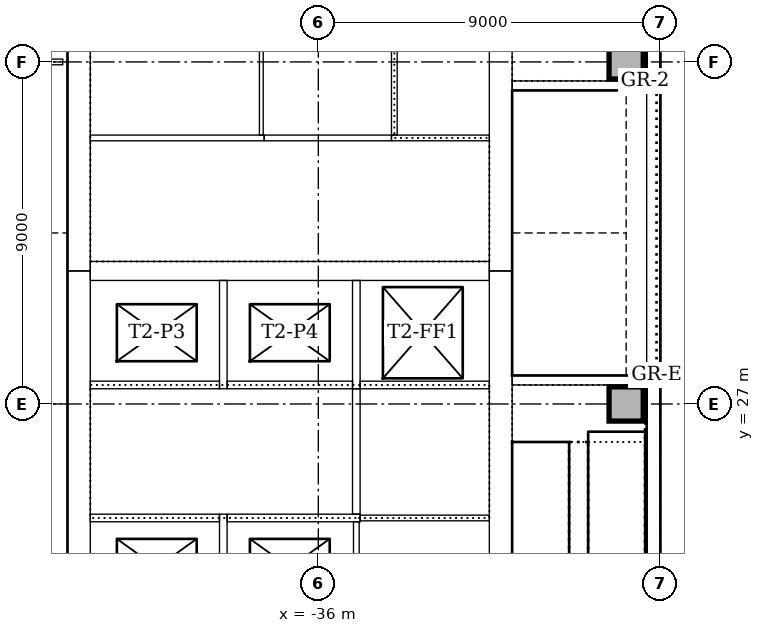
"""IFC4 building model, lengths in metres.
Left out: names, types, materials, properties, quantities, classifications, styles, units other than length and angle.
Written with IfcOpenShell. Run it as: python <this file> out.ifc"""

import sys

from ifc_helpers import new_model, si_unit, direction, frame, frame_2d, origin, origin_2d, place, context, subcontext, project, spatial, rectangle, extrude, element, fill, save


model = new_model("IFC4")
c1 = context("Model", 3, precision=1e-05, world=origin(), true_north=direction((0.0, 1.0)))
c2 = subcontext(c1, "Body", "Model", "MODEL_VIEW")
j1 = project(units=[si_unit("LENGTHUNIT", "METRE"), si_unit("PLANEANGLEUNIT", "RADIAN")], contexts=[c1])
p1 = place(None, origin())
s1 = spatial("IfcSite", under=j1, at=p1, CompositionType="ELEMENT")
p2 = place(p1, origin())
s2 = spatial("IfcBuilding", under=s1, at=p2, CompositionType="ELEMENT")
p3 = place(p2, frame((0.0, 0.0, 26.0)))
s3 = spatial("IfcBuildingStorey", under=s2, at=p3, CompositionType="ELEMENT", Elevation=26.0)
p4 = place(p3, frame((-31.2, 21.0, 0.0), z_axis=(0.0, 0.0, 1.0), x_axis=(0.0, 1.0, 0.0)))
e1 = element("IfcWall", 1, at=p4, inside=s3, PredefinedType="SOLIDWALL", context=c2, shape_type="SweptSolid", body=[
    extrude(rectangle(XDim=9.5, YDim=0.6, at=frame_2d((4.75, 0.0))), origin(), (0.0, 0.0, 1.0), 4.0),
])
p5 = place(p4, frame((5.25, 0.0, 0.0)))
e2 = element("IfcOpeningElement", 2, at=p5, cuts=e1, PredefinedType="OPENING", context=c2, shape_type="SweptSolid", body=[
    extrude(rectangle(XDim=1.0, YDim=2.1, at=frame_2d((0.5, 1.05))), frame((0.0, 0.31, 0.0), z_axis=(0.0, -1.0, 0.0), x_axis=(1.0, 0.0, 0.0)), (0.0, 0.0, 1.0), 0.62),
])
p6 = place(p3, frame((-31.2, 30.5, 0.0), z_axis=(0.0, 0.0, 1.0), x_axis=(0.0, 1.0, 0.0)))
e3 = element("IfcWall", 3, at=p6, inside=s3, PredefinedType="SOLIDWALL", context=c2, shape_type="SweptSolid", body=[
    extrude(rectangle(XDim=11.5, YDim=0.6, at=frame_2d((5.75, 0.0))), origin(), (0.0, 0.0, 1.0), 4.0),
])
p7 = place(p6, frame((0.85, 0.0, 0.0)))
e4 = element("IfcOpeningElement", 4, at=p7, cuts=e3, PredefinedType="OPENING", context=c2, shape_type="SweptSolid", body=[
    extrude(rectangle(XDim=1.8, YDim=2.1, at=frame_2d((0.9, 1.05))), frame((0.0, 0.31, 0.0), z_axis=(0.0, -1.0, 0.0), x_axis=(1.0, 0.0, 0.0)), (0.0, 0.0, 1.0), 0.62),
])
p8 = place(p3, frame((-42.3, 42.0, 0.0), z_axis=(0.0, 0.0, 1.0), x_axis=(0.0, -1.0, 0.0)))
e5 = element("IfcWall", 5, at=p8, inside=s3, PredefinedType="SOLIDWALL", context=c2, shape_type="SweptSolid", body=[
    extrude(rectangle(XDim=11.5, YDim=0.6, at=frame_2d((5.75, 0.0))), origin(), (0.0, 0.0, 1.0), 4.0),
])
p9 = place(p8, frame((8.85, 0.0, 0.0)))
e6 = element("IfcOpeningElement", 6, at=p9, cuts=e5, PredefinedType="OPENING", context=c2, shape_type="SweptSolid", body=[
    extrude(rectangle(XDim=1.8, YDim=2.1, at=frame_2d((0.9, 1.05))), frame((0.0, 0.31, 0.0), z_axis=(0.0, -1.0, 0.0), x_axis=(1.0, 0.0, 0.0)), (0.0, 0.0, 1.0), 0.62),
])
p10 = place(p3, frame((-42.3, 30.5, 0.0), z_axis=(0.0, 0.0, 1.0), x_axis=(0.0, -1.0, 0.0)))
e7 = element("IfcWall", 7, at=p10, inside=s3, PredefinedType="SOLIDWALL", context=c2, shape_type="SweptSolid", body=[
    extrude(rectangle(XDim=9.5, YDim=0.6, at=frame_2d((4.75, 0.0))), origin(), (0.0, 0.0, 1.0), 4.0),
])
p11 = place(p10, frame((3.85, 0.0, 0.0)))
e8 = element("IfcOpeningElement", 8, at=p11, cuts=e7, PredefinedType="OPENING", context=c2, shape_type="SweptSolid", body=[
    extrude(rectangle(XDim=1.8, YDim=2.1, at=frame_2d((0.9, 1.05))), frame((0.0, 0.31, 0.0), z_axis=(0.0, -1.0, 0.0), x_axis=(1.0, 0.0, 0.0)), (0.0, 0.0, 1.0), 0.62),
])
p12 = place(p3, frame((-42.0, 30.5, 0.0), z_axis=(0.0, 0.0, 1.0), x_axis=(1.0, 0.0, 0.0)))
e9 = element("IfcWall", 9, at=p12, inside=s3, PredefinedType="SOLIDWALL", context=c2, shape_type="SweptSolid", body=[
    extrude(rectangle(XDim=10.5, YDim=0.5, at=frame_2d((5.25, 0.0))), origin(), (0.0, 0.0, 1.0), 4.0),
])
p13 = place(p3, frame((-27.36, 27.625, 0.0), z_axis=(0.0, 0.0, 1.0), x_axis=(-1.0, 0.0, 0.0)))
e10 = element("IfcWall", 10, at=p13, inside=s3, PredefinedType="SOLIDWALL", context=c2, shape_type="SweptSolid", body=[
    extrude(rectangle(XDim=3.54, YDim=0.25, at=frame_2d((1.77, 0.0))), origin(), (0.0, 0.0, 1.0), 4.0),
])
p14 = place(p13, frame((1.69, 0.0, 0.0)))
e11 = element("IfcOpeningElement", 11, at=p14, cuts=e10, PredefinedType="OPENING", context=c2, shape_type="SweptSolid", body=[
    extrude(rectangle(XDim=1.1, YDim=2.1, at=frame_2d((0.55, 1.05))), frame((0.0, 0.135, 0.0), z_axis=(0.0, -1.0, 0.0), x_axis=(1.0, 0.0, 0.0)), (0.0, 0.0, 1.0), 0.27),
])
p15 = place(p3, frame((-30.9, 35.375, 0.0), z_axis=(0.0, 0.0, 1.0), x_axis=(1.0, 0.0, 0.0)))
e12 = element("IfcWall", 12, at=p15, inside=s3, PredefinedType="SOLIDWALL", context=c2, shape_type="SweptSolid", body=[
    extrude(rectangle(XDim=3.54, YDim=0.25, at=frame_2d((1.77, 0.0))), origin(), (0.0, 0.0, 1.0), 4.0),
])
p16 = place(p15, frame((0.75, 0.0, 0.0)))
e13 = element("IfcOpeningElement", 13, at=p16, cuts=e12, PredefinedType="OPENING", context=c2, shape_type="SweptSolid", body=[
    extrude(rectangle(XDim=1.1, YDim=2.1, at=frame_2d((0.55, 1.05))), frame((0.0, 0.135, 0.0), z_axis=(0.0, -1.0, 0.0), x_axis=(1.0, 0.0, 0.0)), (0.0, 0.0, 1.0), 0.27),
])
for number, where, z_axis, x_axis in (
    (14, (-27.9, 27.0, 0.0), (0.0, 0.0, 1.0), (1.0, 0.0, 0.0)),
    (15, (-27.9, 36.0, 0.0), (0.0, 0.0, 1.0), (1.0, 0.0, 0.0)),
):
    element("IfcColumn", number, at=place(p3, frame(where, z_axis=z_axis, x_axis=x_axis)), inside=s3, PredefinedType="COLUMN", context=c2, shape_type="SweptSolid", body=[
        extrude(rectangle(XDim=0.9, YDim=0.9, at=origin_2d()), origin(), (0.0, 0.0, 1.0), 4.0),
    ])
p17 = place(p3, frame((-27.18, 21.0, 0.0), z_axis=(0.0, 0.0, 1.0), x_axis=(0.0, 1.0, 0.0)))
e16 = element("IfcWall", 16, at=p17, inside=s3, PredefinedType="STANDARD", context=c2, shape_type="SweptSolid", body=[
    extrude(rectangle(XDim=6.75, YDim=0.36, at=frame_2d((3.375, 0.0))), origin(), (0.0, 0.0, 1.0), 3.85),
])
p18 = place(p3, frame((-27.18, 27.75, 0.0), z_axis=(0.0, 0.0, 1.0), x_axis=(0.0, 1.0, 0.0)))
e17 = element("IfcWall", 17, at=p18, inside=s3, PredefinedType="STANDARD", context=c2, shape_type="SweptSolid", body=[
    extrude(rectangle(XDim=7.5, YDim=0.36, at=frame_2d((3.75, 0.0))), origin(), (0.0, 0.0, 1.0), 3.85),
])
p19 = place(p18, frame((2.85, 0.0, 1.2)))
e18 = element("IfcOpeningElement", 18, at=p19, cuts=e17, PredefinedType="OPENING", context=c2, shape_type="SweptSolid", body=[
    extrude(rectangle(XDim=1.8, YDim=1.2, at=frame_2d((0.9, 0.6))), frame((0.0, 0.19, 0.0), z_axis=(0.0, -1.0, 0.0), x_axis=(1.0, 0.0, 0.0)), (0.0, 0.0, 1.0), 0.38),
])
p20 = place(p3, frame((-27.18, 35.25, 0.0), z_axis=(0.0, 0.0, 1.0), x_axis=(0.0, 1.0, 0.0)))
e19 = element("IfcWall", 19, at=p20, inside=s3, PredefinedType="STANDARD", context=c2, shape_type="SweptSolid", body=[
    extrude(rectangle(XDim=5.507, YDim=0.36, at=frame_2d((2.754, 0.0))), origin(), (0.0, 0.0, 1.0), 3.85),
])
p21 = place(p3, frame((-38.5, 21.0, 0.0), z_axis=(0.0, 0.0, 1.0), x_axis=(0.0, 1.0, 0.0)))
e20 = element("IfcWall", 20, at=p21, inside=s3, PredefinedType="SOLIDWALL", context=c2, shape_type="SweptSolid", body=[
    extrude(rectangle(XDim=3.1, YDim=0.2, at=frame_2d((1.55, 0.0))), origin(), (0.0, 0.0, 1.0), 4.0),
])
p22 = place(p3, frame((-38.6, 24.0, 0.0), z_axis=(0.0, 0.0, 1.0), x_axis=(-1.0, 0.0, 0.0)))
e21 = element("IfcWall", 21, at=p22, inside=s3, PredefinedType="SOLIDWALL", context=c2, shape_type="SweptSolid", body=[
    extrude(rectangle(XDim=3.4, YDim=0.2, at=frame_2d((1.7, 0.0))), origin(), (0.0, 0.0, 1.0), 4.0),
])
p23 = place(p22, frame((0.8, 0.0, 0.0)))
e22 = element("IfcOpeningElement", 22, at=p23, cuts=e21, PredefinedType="OPENING", context=c2, shape_type="SweptSolid", body=[
    extrude(rectangle(XDim=1.1, YDim=2.1, at=frame_2d((0.55, 1.05))), frame((0.0, 0.11, 0.0), z_axis=(0.0, -1.0, 0.0), x_axis=(1.0, 0.0, 0.0)), (0.0, 0.0, 1.0), 0.22),
])
p24 = place(p3, frame((-34.9, 24.0, 0.0), z_axis=(0.0, 0.0, 1.0), x_axis=(-1.0, 0.0, 0.0)))
e23 = element("IfcWall", 23, at=p24, inside=s3, PredefinedType="SOLIDWALL", context=c2, shape_type="SweptSolid", body=[
    extrude(rectangle(XDim=3.5, YDim=0.2, at=frame_2d((1.75, 0.0))), origin(), (0.0, 0.0, 1.0), 4.0),
])
p25 = place(p24, frame((1.3, 0.0, 0.0)))
e24 = element("IfcOpeningElement", 24, at=p25, cuts=e23, PredefinedType="OPENING", context=c2, shape_type="SweptSolid", body=[
    extrude(rectangle(XDim=1.1, YDim=2.1, at=frame_2d((0.55, 1.05))), frame((0.0, 0.11, 0.0), z_axis=(0.0, -1.0, 0.0), x_axis=(1.0, 0.0, 0.0)), (0.0, 0.0, 1.0), 0.22),
])
p26 = place(p3, frame((-38.5, 27.4, 0.0), z_axis=(0.0, 0.0, 1.0), x_axis=(0.0, 1.0, 0.0)))
e25 = element("IfcWall", 25, at=p26, inside=s3, PredefinedType="SOLIDWALL", context=c2, shape_type="SweptSolid", body=[
    extrude(rectangle(XDim=2.85, YDim=0.2, at=frame_2d((1.425, 0.0))), origin(), (0.0, 0.0, 1.0), 4.0),
])
p27 = place(p3, frame((-42.0, 27.5, 0.0), z_axis=(0.0, 0.0, 1.0), x_axis=(1.0, 0.0, 0.0)))
e26 = element("IfcWall", 26, at=p27, inside=s3, PredefinedType="SOLIDWALL", context=c2, shape_type="SweptSolid", body=[
    extrude(rectangle(XDim=3.4, YDim=0.2, at=frame_2d((1.7, 0.0))), origin(), (0.0, 0.0, 1.0), 4.0),
])
p28 = place(p27, frame((1.5, 0.0, 0.0)))
e27 = element("IfcOpeningElement", 27, at=p28, cuts=e26, PredefinedType="OPENING", context=c2, shape_type="SweptSolid", body=[
    extrude(rectangle(XDim=1.1, YDim=2.1, at=frame_2d((0.55, 1.05))), frame((0.0, 0.11, 0.0), z_axis=(0.0, -1.0, 0.0), x_axis=(1.0, 0.0, 0.0)), (0.0, 0.0, 1.0), 0.22),
])
p29 = place(p3, frame((-35.0, 27.4, 0.0), z_axis=(0.0, 0.0, 1.0), x_axis=(0.0, 1.0, 0.0)))
e28 = element("IfcWall", 28, at=p29, inside=s3, PredefinedType="SOLIDWALL", context=c2, shape_type="SweptSolid", body=[
    extrude(rectangle(XDim=2.85, YDim=0.2, at=frame_2d((1.425, 0.0))), origin(), (0.0, 0.0, 1.0), 4.0),
])
p30 = place(p3, frame((-38.4, 27.5, 0.0), z_axis=(0.0, 0.0, 1.0), x_axis=(1.0, 0.0, 0.0)))
e29 = element("IfcWall", 29, at=p30, inside=s3, PredefinedType="SOLIDWALL", context=c2, shape_type="SweptSolid", body=[
    extrude(rectangle(XDim=3.3, YDim=0.2, at=frame_2d((1.65, 0.0))), origin(), (0.0, 0.0, 1.0), 4.0),
])
p31 = place(p30, frame((1.1, 0.0, 0.0)))
e30 = element("IfcOpeningElement", 30, at=p31, cuts=e29, PredefinedType="OPENING", context=c2, shape_type="SweptSolid", body=[
    extrude(rectangle(XDim=1.1, YDim=2.1, at=frame_2d((0.55, 1.05))), frame((0.0, 0.11, 0.0), z_axis=(0.0, -1.0, 0.0), x_axis=(1.0, 0.0, 0.0)), (0.0, 0.0, 1.0), 0.22),
])
p32 = place(p3, frame((-34.9, 27.5, 0.0), z_axis=(0.0, 0.0, 1.0), x_axis=(1.0, 0.0, 0.0)))
e31 = element("IfcWall", 31, at=p32, inside=s3, PredefinedType="SOLIDWALL", context=c2, shape_type="SweptSolid", body=[
    extrude(rectangle(XDim=3.4, YDim=0.2, at=frame_2d((1.7, 0.0))), origin(), (0.0, 0.0, 1.0), 4.0),
])
p33 = place(p32, frame((1.1, 0.0, 0.0)))
e32 = element("IfcOpeningElement", 32, at=p33, cuts=e31, PredefinedType="OPENING", context=c2, shape_type="SweptSolid", body=[
    extrude(rectangle(XDim=1.1, YDim=2.1, at=frame_2d((0.55, 1.05))), frame((0.0, 0.11, 0.0), z_axis=(0.0, -1.0, 0.0), x_axis=(1.0, 0.0, 0.0)), (0.0, 0.0, 1.0), 0.22),
])
p34 = place(p3, frame((-35.0, 24.1, 0.0), z_axis=(0.0, 0.0, 1.0), x_axis=(0.0, 1.0, 0.0)))
e33 = element("IfcWall", 33, at=p34, inside=s3, PredefinedType="SOLIDWALL", context=c2, shape_type="SweptSolid", body=[
    extrude(rectangle(XDim=3.3, YDim=0.2, at=frame_2d((1.65, 0.0))), origin(), (0.0, 0.0, 1.0), 4.0),
])
p35 = place(p34, frame((1.15, 0.0, 0.0)))
e34 = element("IfcOpeningElement", 34, at=p35, cuts=e33, PredefinedType="OPENING", context=c2, shape_type="SweptSolid", body=[
    extrude(rectangle(XDim=1.0, YDim=2.1, at=frame_2d((0.5, 1.05))), frame((0.0, 0.11, 0.0), z_axis=(0.0, -1.0, 0.0), x_axis=(1.0, 0.0, 0.0)), (0.0, 0.0, 1.0), 0.22),
])
p36 = place(p3, frame((-35.0, 21.0, 0.0), z_axis=(0.0, 0.0, 1.0), x_axis=(0.0, 1.0, 0.0)))
e35 = element("IfcWall", 35, at=p36, inside=s3, PredefinedType="SOLIDWALL", context=c2, shape_type="SweptSolid", body=[
    extrude(rectangle(XDim=2.9, YDim=0.15, at=frame_2d((1.45, 0.0))), origin(), (0.0, 0.0, 1.0), 4.0),
])
p37 = place(p3, frame((-31.5, 24.0, 0.0), z_axis=(0.0, 0.0, 1.0), x_axis=(-1.0, 0.0, 0.0)))
e36 = element("IfcWall", 36, at=p37, inside=s3, PredefinedType="SOLIDWALL", context=c2, shape_type="SweptSolid", body=[
    extrude(rectangle(XDim=3.4, YDim=0.15, at=frame_2d((1.7, 0.0))), origin(), (0.0, 0.0, 1.0), 4.0),
])
p38 = place(p3, frame((-34.075, 34.0, 0.0), z_axis=(0.0, 0.0, 1.0), x_axis=(1.0, 0.0, 0.0)))
e37 = element("IfcWall", 37, at=p38, inside=s3, PredefinedType="SOLIDWALL", context=c2, shape_type="SweptSolid", body=[
    extrude(rectangle(XDim=2.575, YDim=0.15, at=frame_2d((1.288, 0.0))), origin(), (0.0, 0.0, 1.0), 4.0),
])
p39 = place(p3, frame((-34.0, 41.075, 0.0), z_axis=(0.0, 0.0, 1.0), x_axis=(0.0, -1.0, 0.0)))
e38 = element("IfcWall", 38, at=p39, inside=s3, PredefinedType="SOLIDWALL", context=c2, shape_type="SweptSolid", body=[
    extrude(rectangle(XDim=7.0, YDim=0.15, at=frame_2d((3.5, 0.0))), origin(), (0.0, 0.0, 1.0), 4.0),
])
p40 = place(p3, frame((-37.425, 34.0, 0.0), z_axis=(0.0, 0.0, 1.0), x_axis=(-1.0, 0.0, 0.0)))
e39 = element("IfcWall", 39, at=p40, inside=s3, PredefinedType="PARTITIONING", context=c2, shape_type="SweptSolid", body=[
    extrude(rectangle(XDim=4.575, YDim=0.15, at=frame_2d((2.288, 0.0))), origin(), (0.0, 0.0, 1.0), 3.85),
])
p41 = place(p40, frame((1.925, 0.0, 0.0)))
e40 = element("IfcOpeningElement", 40, at=p41, cuts=e39, PredefinedType="OPENING", context=c2, shape_type="SweptSolid", body=[
    extrude(rectangle(XDim=0.8, YDim=2.1, at=frame_2d((0.4, 1.05))), frame((0.0, 0.085, 0.0), z_axis=(0.0, -1.0, 0.0), x_axis=(1.0, 0.0, 0.0)), (0.0, 0.0, 1.0), 0.17),
])
p42 = place(p3, frame((-34.075, 34.0, 0.0), z_axis=(0.0, 0.0, 1.0), x_axis=(-1.0, 0.0, 0.0)))
e41 = element("IfcWall", 41, at=p42, inside=s3, PredefinedType="PARTITIONING", context=c2, shape_type="SweptSolid", body=[
    extrude(rectangle(XDim=3.35, YDim=0.15, at=frame_2d((1.675, 0.0))), origin(), (0.0, 0.0, 1.0), 3.85),
])
p43 = place(p42, frame((1.275, 0.0, 0.0)))
e42 = element("IfcOpeningElement", 42, at=p43, cuts=e41, PredefinedType="OPENING", context=c2, shape_type="SweptSolid", body=[
    extrude(rectangle(XDim=0.8, YDim=2.1, at=frame_2d((0.4, 1.05))), frame((0.0, 0.085, 0.0), z_axis=(0.0, -1.0, 0.0), x_axis=(1.0, 0.0, 0.0)), (0.0, 0.0, 1.0), 0.17),
])
p44 = place(p3, frame((-37.5, 34.075, 0.0), z_axis=(0.0, 0.0, 1.0), x_axis=(0.0, 1.0, 0.0)))
e43 = element("IfcWall", 43, at=p44, inside=s3, PredefinedType="PARTITIONING", context=c2, shape_type="SweptSolid", body=[
    extrude(rectangle(XDim=7.925, YDim=0.1, at=frame_2d((3.962, 0.0))), origin(), (0.0, 0.0, 1.0), 3.85),
])
p45 = place(p3, frame((-44.6, 36.0, 0.0), z_axis=(0.0, 0.0, 1.0), x_axis=(1.0, 0.0, 0.0)))
e44 = element("IfcWall", 44, at=p45, inside=s3, PredefinedType="PARTITIONING", context=c2, shape_type="SweptSolid", body=[
    extrude(rectangle(XDim=1.875, YDim=0.15, at=frame_2d((0.938, 0.0))), origin(), (0.0, 0.0, 1.0), 3.602),
])
p46 = place(p45, frame((0.5, 0.0, 0.0)))
e45 = element("IfcOpeningElement", 45, at=p46, cuts=e44, PredefinedType="OPENING", context=c2, shape_type="SweptSolid", body=[
    extrude(rectangle(XDim=0.9, YDim=2.1, at=frame_2d((0.45, 1.05))), frame((0.0, 0.085, 0.0), z_axis=(0.0, -1.0, 0.0), x_axis=(1.0, 0.0, 0.0)), (0.0, 0.0, 1.0), 0.17),
])
p47 = place(p19, origin())
e46 = element("IfcWindow", 46, at=p47, inside=s3, PartitioningType="SINGLE_PANEL", PredefinedType="WINDOW", context=c2, shape_type="SweptSolid", body=[
    extrude(rectangle(XDim=1.8, YDim=1.2, at=frame_2d((0.9, 0.6))), frame((0.0, 0.13, 0.0), z_axis=(0.0, -1.0, 0.0), x_axis=(1.0, 0.0, 0.0)), (0.0, 0.0, 1.0), 0.06),
])
fill(e18, e46)
p48 = place(p23, origin())
e47 = element("IfcDoor", 47, at=p48, inside=s3, OperationType="SLIDING_TO_LEFT", PredefinedType="DOOR", context=c2, shape_type="SweptSolid", body=[
    extrude(rectangle(XDim=1.1, YDim=2.1, at=frame_2d((0.55, 1.05))), frame((0.0, 0.025, 0.0), z_axis=(0.0, -1.0, 0.0), x_axis=(1.0, 0.0, 0.0)), (0.0, 0.0, 1.0), 0.05),
])
fill(e22, e47)
p49 = place(p25, origin())
e48 = element("IfcDoor", 48, at=p49, inside=s3, OperationType="SLIDING_TO_LEFT", PredefinedType="DOOR", context=c2, shape_type="SweptSolid", body=[
    extrude(rectangle(XDim=1.1, YDim=2.1, at=frame_2d((0.55, 1.05))), frame((0.0, 0.025, 0.0), z_axis=(0.0, -1.0, 0.0), x_axis=(1.0, 0.0, 0.0)), (0.0, 0.0, 1.0), 0.05),
])
fill(e24, e48)
p50 = place(p28, origin())
e49 = element("IfcDoor", 49, at=p50, inside=s3, OperationType="SLIDING_TO_LEFT", PredefinedType="DOOR", context=c2, shape_type="SweptSolid", body=[
    extrude(rectangle(XDim=1.1, YDim=2.1, at=frame_2d((0.55, 1.05))), frame((0.0, 0.025, 0.0), z_axis=(0.0, -1.0, 0.0), x_axis=(1.0, 0.0, 0.0)), (0.0, 0.0, 1.0), 0.05),
])
fill(e27, e49)
p51 = place(p31, origin())
e50 = element("IfcDoor", 50, at=p51, inside=s3, OperationType="SLIDING_TO_LEFT", PredefinedType="DOOR", context=c2, shape_type="SweptSolid", body=[
    extrude(rectangle(XDim=1.1, YDim=2.1, at=frame_2d((0.55, 1.05))), frame((0.0, 0.025, 0.0), z_axis=(0.0, -1.0, 0.0), x_axis=(1.0, 0.0, 0.0)), (0.0, 0.0, 1.0), 0.05),
])
fill(e30, e50)
p52 = place(p33, origin())
e51 = element("IfcDoor", 51, at=p52, inside=s3, OperationType="SLIDING_TO_LEFT", PredefinedType="DOOR", context=c2, shape_type="SweptSolid", body=[
    extrude(rectangle(XDim=1.1, YDim=2.1, at=frame_2d((0.55, 1.05))), frame((0.0, 0.025, 0.0), z_axis=(0.0, -1.0, 0.0), x_axis=(1.0, 0.0, 0.0)), (0.0, 0.0, 1.0), 0.05),
])
fill(e32, e51)
p53 = place(p35, origin())
e52 = element("IfcDoor", 52, at=p53, inside=s3, OperationType="SINGLE_SWING_RIGHT", PredefinedType="DOOR", context=c2, shape_type="SweptSolid", body=[
    extrude(rectangle(XDim=1.0, YDim=2.1, at=frame_2d((0.5, 1.05))), frame((0.0, 0.025, 0.0), z_axis=(0.0, -1.0, 0.0), x_axis=(1.0, 0.0, 0.0)), (0.0, 0.0, 1.0), 0.05),
])
fill(e34, e52)
p54 = place(p5, frame((1.0, 0.0, 0.0), z_axis=(0.0, 0.0, 1.0), x_axis=(-1.0, 0.0, 0.0)))
e53 = element("IfcDoor", 53, at=p54, inside=s3, OperationType="SINGLE_SWING_LEFT", PredefinedType="DOOR", context=c2, shape_type="SweptSolid", body=[
    extrude(rectangle(XDim=1.0, YDim=2.1, at=frame_2d((0.5, 1.05))), frame((0.0, 0.025, 0.0), z_axis=(0.0, -1.0, 0.0), x_axis=(1.0, 0.0, 0.0)), (0.0, 0.0, 1.0), 0.05),
])
fill(e2, e53)
p55 = place(p14, origin())
e54 = element("IfcDoor", 54, at=p55, inside=s3, OperationType="SINGLE_SWING_RIGHT", PredefinedType="DOOR", context=c2, shape_type="SweptSolid", body=[
    extrude(rectangle(XDim=1.1, YDim=2.1, at=frame_2d((0.55, 1.05))), frame((0.0, 0.025, 0.0), z_axis=(0.0, -1.0, 0.0), x_axis=(1.0, 0.0, 0.0)), (0.0, 0.0, 1.0), 0.05),
])
fill(e11, e54)
p56 = place(p16, origin())
e55 = element("IfcDoor", 55, at=p56, inside=s3, OperationType="SINGLE_SWING_RIGHT", PredefinedType="DOOR", context=c2, shape_type="SweptSolid", body=[
    extrude(rectangle(XDim=1.1, YDim=2.1, at=frame_2d((0.55, 1.05))), frame((0.0, 0.025, 0.0), z_axis=(0.0, -1.0, 0.0), x_axis=(1.0, 0.0, 0.0)), (0.0, 0.0, 1.0), 0.05),
])
fill(e13, e55)
p57 = place(p7, origin())
e56 = element("IfcDoor", 56, at=p57, inside=s3, OperationType="DOUBLE_DOOR_SINGLE_SWING", PredefinedType="DOOR", context=c2, shape_type="SweptSolid", body=[
    extrude(rectangle(XDim=1.8, YDim=2.1, at=frame_2d((0.9, 1.05))), frame((0.0, 0.025, 0.0), z_axis=(0.0, -1.0, 0.0), x_axis=(1.0, 0.0, 0.0)), (0.0, 0.0, 1.0), 0.05),
])
fill(e4, e56)
p58 = place(p11, origin())
e57 = element("IfcDoor", 57, at=p58, inside=s3, OperationType="DOUBLE_DOOR_SINGLE_SWING", PredefinedType="DOOR", context=c2, shape_type="SweptSolid", body=[
    extrude(rectangle(XDim=1.8, YDim=2.1, at=frame_2d((0.9, 1.05))), frame((0.0, 0.025, 0.0), z_axis=(0.0, -1.0, 0.0), x_axis=(1.0, 0.0, 0.0)), (0.0, 0.0, 1.0), 0.05),
])
fill(e8, e57)
p59 = place(p9, frame((1.8, 0.0, 0.0), z_axis=(0.0, 0.0, 1.0), x_axis=(-1.0, 0.0, 0.0)))
e58 = element("IfcDoor", 58, at=p59, inside=s3, OperationType="DOUBLE_DOOR_SINGLE_SWING", PredefinedType="DOOR", context=c2, shape_type="SweptSolid", body=[
    extrude(rectangle(XDim=1.8, YDim=2.1, at=frame_2d((0.9, 1.05))), frame((0.0, 0.025, 0.0), z_axis=(0.0, -1.0, 0.0), x_axis=(1.0, 0.0, 0.0)), (0.0, 0.0, 1.0), 0.05),
])
fill(e6, e58)
p60 = place(p41, frame((0.8, 0.0, 0.0), z_axis=(0.0, 0.0, 1.0), x_axis=(-1.0, 0.0, 0.0)))
e59 = element("IfcDoor", 59, at=p60, inside=s3, OperationType="SINGLE_SWING_RIGHT", PredefinedType="DOOR", context=c2, shape_type="SweptSolid", body=[
    extrude(rectangle(XDim=0.8, YDim=2.1, at=frame_2d((0.4, 1.05))), frame((0.0, 0.025, 0.0), z_axis=(0.0, -1.0, 0.0), x_axis=(1.0, 0.0, 0.0)), (0.0, 0.0, 1.0), 0.05),
])
fill(e40, e59)
p61 = place(p43, frame((0.8, 0.0, 0.0), z_axis=(0.0, 0.0, 1.0), x_axis=(-1.0, 0.0, 0.0)))
e60 = element("IfcDoor", 60, at=p61, inside=s3, OperationType="SINGLE_SWING_LEFT", PredefinedType="DOOR", context=c2, shape_type="SweptSolid", body=[
    extrude(rectangle(XDim=0.8, YDim=2.1, at=frame_2d((0.4, 1.05))), frame((0.0, 0.025, 0.0), z_axis=(0.0, -1.0, 0.0), x_axis=(1.0, 0.0, 0.0)), (0.0, 0.0, 1.0), 0.05),
])
fill(e42, e60)
save(model, sys.argv[1])
